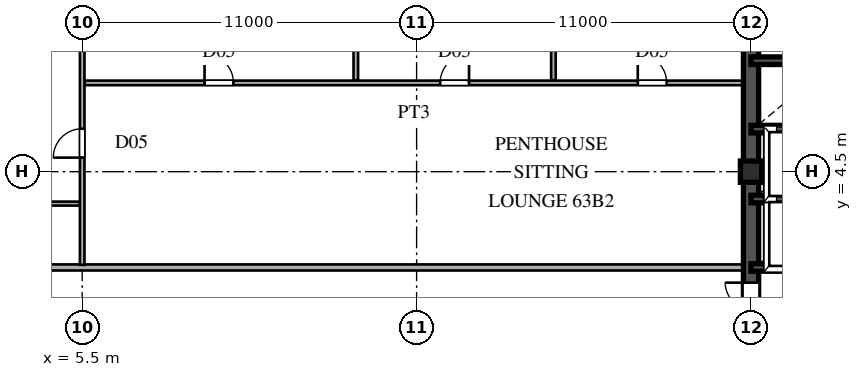
"""IFC4 building model, lengths in metres.
Left out: names, types, materials, properties, quantities, classifications, styles, units other than length and angle.
Written with IfcOpenShell. Run it as: python <this file> out.ifc"""

import sys

from ifc_helpers import new_model, si_unit, direction, frame, frame_2d, origin, origin_2d, place, context, subcontext, project, spatial, rectangle, hollow_rectangle, extrude, source, transform, mapped, element, fill, save


model = new_model("IFC4")
c1 = context("Model", 3, precision=1e-05, world=origin(), true_north=direction((0.0, 1.0)))
c2 = subcontext(c1, "Body", "Model", "MODEL_VIEW")
j1 = project(units=[si_unit("LENGTHUNIT", "METRE"), si_unit("PLANEANGLEUNIT", "RADIAN")], contexts=[c1])
p1 = place(None, origin())
s1 = spatial("IfcSite", under=j1, at=p1, CompositionType="ELEMENT")
p2 = place(p1, origin())
s2 = spatial("IfcBuilding", under=s1, at=p2, CompositionType="ELEMENT")
p3 = place(p2, frame((0.0, 0.0, 239.4)))
s3 = spatial("IfcBuildingStorey", under=s2, at=p3, CompositionType="ELEMENT", Elevation=239.4)
m1 = source(origin(), c2, "Body", "SweptSolid", [
    extrude(hollow_rectangle(XDim=0.7, YDim=0.7, WallThickness=0.03, at=origin_2d()), origin(), (0.0, 0.0, 1.0), 3.75),
])
p4 = place(p3, frame((27.5, 4.5, 0.0), z_axis=(0.0, 0.0, 1.0), x_axis=(1.0, 0.0, 0.0)))
e1 = element("IfcColumn", 1, at=p4, inside=s3, PredefinedType="COLUMN", context=c2, shape_type="MappedRepresentation", body=[
    mapped(m1, transform((0.0, 0.0, 0.0), scale=1.0)),
])
p5 = place(p3, frame((27.5, 1.3, 0.0), z_axis=(0.0, 0.0, 1.0), x_axis=(0.0, 1.0, 0.0)))
e2 = element("IfcWall", 2, at=p5, inside=s3, PredefinedType="SHEAR", context=c2, shape_type="SweptSolid", body=[
    extrude(rectangle(XDim=12.2, YDim=0.5, at=frame_2d((6.1, 0.0))), origin(), (0.0, 0.0, 1.0), 3.53),
])
p6 = place(p3, frame((27.5, -1.3, 0.0), z_axis=(0.0, 0.0, 1.0), x_axis=(0.0, 1.0, 0.0)))
e3 = element("IfcWall", 3, at=p6, inside=s3, PredefinedType="SHEAR", context=c2, shape_type="SweptSolid", body=[
    extrude(rectangle(XDim=2.6, YDim=0.5, at=frame_2d((1.3, 0.0))), origin(), (0.0, 0.0, 1.0), 3.53),
])
p7 = place(p6, frame((0.45, 0.0, 0.0)))
e4 = element("IfcOpeningElement", 4, at=p7, cuts=e3, PredefinedType="OPENING", context=c2, shape_type="SweptSolid", body=[
    extrude(rectangle(XDim=1.7, YDim=2.35, at=frame_2d((0.85, 1.175))), frame((0.0, 0.26, 0.0), z_axis=(0.0, -1.0, 0.0), x_axis=(1.0, 0.0, 0.0)), (0.0, 0.0, 1.0), 0.52),
])
for number, where, z_axis, x_axis in (
    (5, (27.5, 1.35, 0.0), (0.0, 0.0, 1.0), (1.0, 0.0, 0.0)),
    (6, (27.5, 3.6, 0.0), (0.0, 0.0, 1.0), (1.0, 0.0, 0.0)),
    (7, (27.5, 5.9, 0.0), (0.0, 0.0, 1.0), (1.0, 0.0, 0.0)),
    (8, (27.5, 8.15, 0.0), (0.0, 0.0, 1.0), (1.0, 0.0, 0.0)),
):
    element("IfcWall", number, at=place(p3, frame(where, z_axis=z_axis, x_axis=x_axis)), inside=s3, PredefinedType="SHEAR", context=c2, shape_type="SweptSolid", body=[
        extrude(rectangle(XDim=2.8, YDim=0.25, at=frame_2d((1.4, 0.0))), origin(), (0.0, 0.0, 1.0), 3.53),
    ])
p8 = place(p3, frame((-27.245, 1.35, 0.0), z_axis=(0.0, 0.0, 1.0), x_axis=(1.0, 0.0, 0.0)))
e9 = element("IfcWall", 9, at=p8, inside=s3, PredefinedType="PARTITIONING", context=c2, shape_type="SweptSolid", body=[
    extrude(rectangle(XDim=54.49, YDim=0.2, at=frame_2d((27.245, 0.0))), origin(), (0.0, 0.0, 1.0), 3.53),
])
p9 = place(p8, frame((23.47, 0.0, 0.0)))
e10 = element("IfcOpeningElement", 10, at=p9, cuts=e9, PredefinedType="OPENING", context=c2, shape_type="SweptSolid", body=[
    extrude(rectangle(XDim=1.05, YDim=2.25, at=frame_2d((0.525, 1.125))), frame((0.0, 0.11, 0.0), z_axis=(0.0, -1.0, 0.0), x_axis=(1.0, 0.0, 0.0)), (0.0, 0.0, 1.0), 0.22),
])
p10 = place(p3, frame((0.085, 3.45, 0.0), z_axis=(0.0, 0.0, 1.0), x_axis=(1.0, 0.0, 0.0)))
e11 = element("IfcWall", 11, at=p10, inside=s3, PredefinedType="PARTITIONING", context=c2, shape_type="SweptSolid", body=[
    extrude(rectangle(XDim=5.33, YDim=0.13, at=frame_2d((2.665, 0.0))), origin(), (0.0, 0.0, 1.0), 3.53),
])
p11 = place(p3, frame((5.585, 7.42, 0.0), z_axis=(0.0, 0.0, 1.0), x_axis=(1.0, 0.0, 0.0)))
e12 = element("IfcWall", 12, at=p11, inside=s3, PredefinedType="PARTITIONING", context=c2, shape_type="SweptSolid", body=[
    extrude(rectangle(XDim=21.66, YDim=0.15, at=frame_2d((10.83, 0.0))), origin(), (0.0, 0.0, 1.0), 3.53),
])
p12 = place(p11, frame((3.94, 0.0, 0.0)))
e13 = element("IfcOpeningElement", 13, at=p12, cuts=e12, PredefinedType="OPENING", context=c2, shape_type="SweptSolid", body=[
    extrude(rectangle(XDim=0.95, YDim=2.15, at=frame_2d((0.475, 1.075))), frame((0.0, 0.085, 0.0), z_axis=(0.0, -1.0, 0.0), x_axis=(1.0, 0.0, 0.0)), (0.0, 0.0, 1.0), 0.17),
])
p13 = place(p11, frame((11.69, 0.0, 0.0)))
e14 = element("IfcOpeningElement", 14, at=p13, cuts=e12, PredefinedType="OPENING", context=c2, shape_type="SweptSolid", body=[
    extrude(rectangle(XDim=0.95, YDim=2.15, at=frame_2d((0.475, 1.075))), frame((0.0, 0.085, 0.0), z_axis=(0.0, -1.0, 0.0), x_axis=(1.0, 0.0, 0.0)), (0.0, 0.0, 1.0), 0.17),
])
p14 = place(p11, frame((18.19, 0.0, 0.0)))
e15 = element("IfcOpeningElement", 15, at=p14, cuts=e12, PredefinedType="OPENING", context=c2, shape_type="SweptSolid", body=[
    extrude(rectangle(XDim=0.95, YDim=2.15, at=frame_2d((0.475, 1.075))), frame((0.0, 0.085, 0.0), z_axis=(0.0, -1.0, 0.0), x_axis=(1.0, 0.0, 0.0)), (0.0, 0.0, 1.0), 0.17),
])
p15 = place(p3, frame((5.5, 1.435, 0.0), z_axis=(0.0, 0.0, 1.0), x_axis=(0.0, 1.0, 0.0)))
e16 = element("IfcWall", 16, at=p15, inside=s3, PredefinedType="PARTITIONING", context=c2, shape_type="SweptSolid", body=[
    extrude(rectangle(XDim=11.955, YDim=0.15, at=frame_2d((5.978, 0.0))), origin(), (0.0, 0.0, 1.0), 2.43),
])
p16 = place(p15, frame((3.528, 0.0, 0.0)))
e17 = element("IfcOpeningElement", 17, at=p16, cuts=e16, PredefinedType="OPENING", context=c2, shape_type="SweptSolid", body=[
    extrude(rectangle(XDim=0.95, YDim=2.15, at=frame_2d((0.475, 1.075))), frame((0.0, 0.085, 0.0), z_axis=(0.0, -1.0, 0.0), x_axis=(1.0, 0.0, 0.0)), (0.0, 0.0, 1.0), 0.17),
])
for number, where, z_axis, x_axis in (
    (18, (14.5, 7.51, 0.0), (0.0, 0.0, 1.0), (0.0, 1.0, 0.0)),
    (19, (21.0, 7.51, 0.0), (0.0, 0.0, 1.0), (0.0, 1.0, 0.0)),
):
    element("IfcWall", number, at=place(p3, frame(where, z_axis=z_axis, x_axis=x_axis)), inside=s3, PredefinedType="PARTITIONING", context=c2, shape_type="SweptSolid", body=[
        extrude(rectangle(XDim=5.99, YDim=0.15, at=frame_2d((2.995, 0.0))), origin(), (0.0, 0.0, 1.0), 3.53),
    ])
m2 = source(origin(), c2, "Body", "SweptSolid", [
    extrude(rectangle(XDim=1.7, YDim=2.35, at=frame_2d((0.85, 1.175))), frame((0.0, 0.025, 0.0), z_axis=(0.0, -1.0, 0.0), x_axis=(1.0, 0.0, 0.0)), (0.0, 0.0, 1.0), 0.05),
])
p17 = place(p7, origin())
e20 = element("IfcDoor", 20, at=p17, inside=s3, OperationType="DOUBLE_SWING_LEFT", PredefinedType="DOOR", context=c2, shape_type="MappedRepresentation", body=[
    mapped(m2, transform((0.0, 0.0, 0.0), scale=1.0)),
])
fill(e4, e20)
m3 = source(origin(), c2, "Body", "SweptSolid", [
    extrude(rectangle(XDim=0.95, YDim=2.15, at=frame_2d((0.475, 1.075))), frame((0.0, 0.025, 0.0), z_axis=(0.0, -1.0, 0.0), x_axis=(1.0, 0.0, 0.0)), (0.0, 0.0, 1.0), 0.05),
])
p18 = place(p12, origin())
e21 = element("IfcDoor", 21, at=p18, inside=s3, OperationType="SINGLE_SWING_LEFT", PredefinedType="DOOR", context=c2, shape_type="MappedRepresentation", body=[
    mapped(m3, transform((0.0, 0.0, 0.0), scale=1.0)),
])
fill(e13, e21)
p19 = place(p13, origin())
e22 = element("IfcDoor", 22, at=p19, inside=s3, OperationType="SINGLE_SWING_RIGHT", PredefinedType="DOOR", context=c2, shape_type="MappedRepresentation", body=[
    mapped(m3, transform((0.0, 0.0, 0.0), scale=1.0)),
])
fill(e14, e22)
p20 = place(p14, origin())
e23 = element("IfcDoor", 23, at=p20, inside=s3, OperationType="SINGLE_SWING_LEFT", PredefinedType="DOOR", context=c2, shape_type="MappedRepresentation", body=[
    mapped(m3, transform((0.0, 0.0, 0.0), scale=1.0)),
])
fill(e15, e23)
p21 = place(p16, origin())
e24 = element("IfcDoor", 24, at=p21, inside=s3, OperationType="SINGLE_SWING_LEFT", PredefinedType="DOOR", context=c2, shape_type="MappedRepresentation", body=[
    mapped(m3, transform((0.0, 0.0, 0.0), scale=1.0)),
])
fill(e17, e24)
save(model, sys.argv[1])
